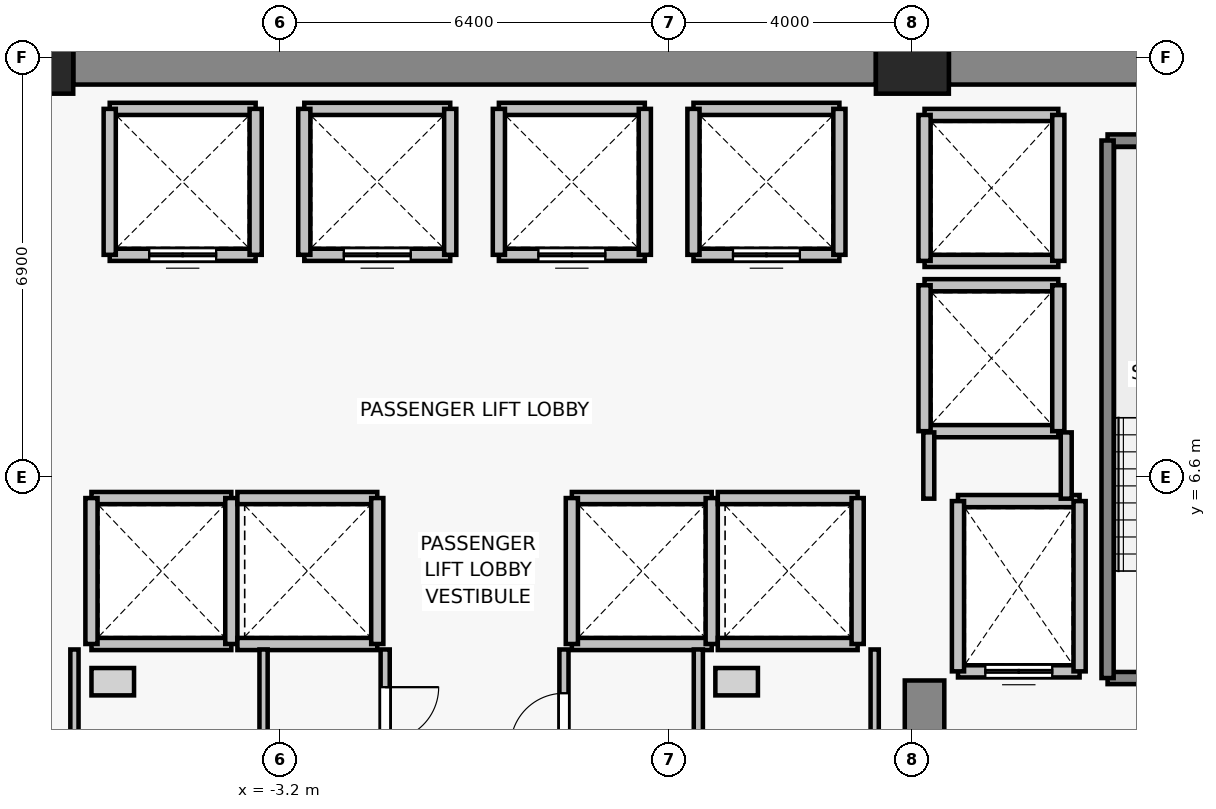
"""IFC4 building model, lengths in metres.
Left out: names, types, materials, properties, quantities, classifications, styles, units other than length and angle.
Written with IfcOpenShell. Run it as: python <this file> out.ifc"""

import sys

from ifc_helpers import new_model, si_unit, direction, frame, frame_2d, origin, origin_2d, place, context, subcontext, project, spatial, rectangle, extrude, source, transform, mapped, element, fill, save


model = new_model("IFC4")
c1 = context("Model", 3, precision=1e-05, world=origin(), true_north=direction((0.0, 1.0)))
c2 = subcontext(c1, "Body", "Model", "MODEL_VIEW")
j1 = project(units=[si_unit("LENGTHUNIT", "METRE"), si_unit("PLANEANGLEUNIT", "RADIAN")], contexts=[c1])
p1 = place(None, origin())
s1 = spatial("IfcSite", under=j1, at=p1, CompositionType="ELEMENT")
p2 = place(p1, origin())
s2 = spatial("IfcBuilding", under=s1, at=p2, CompositionType="ELEMENT")
p3 = place(p2, frame((0.0, 0.0, 50.5)))
s3 = spatial("IfcBuildingStorey", under=s2, at=p3, CompositionType="ELEMENT", Elevation=50.5)
for number, where, z_axis, x_axis in (
    (1, (-7.2, 13.5, 0.0), (0.0, 0.0, 1.0), (1.0, 0.0, 0.0)),
    (2, (7.2, 13.5, 0.0), (0.0, 0.0, 1.0), (1.0, 0.0, 0.0)),
):
    element("IfcColumn", number, at=place(p3, frame(where, z_axis=z_axis, x_axis=x_axis)), inside=s3, PredefinedType="COLUMN", context=c2, shape_type="SweptSolid", body=[
        extrude(rectangle(XDim=1.2, YDim=1.2, at=origin_2d()), origin(), (0.0, 0.0, 1.0), 3.3),
    ])
p4 = place(p3, frame((-6.6, 13.5, 0.0), z_axis=(0.0, 0.0, 1.0), x_axis=(1.0, 0.0, 0.0)))
e3 = element("IfcWall", 3, at=p4, inside=s3, PredefinedType="SHEAR", context=c2, shape_type="SweptSolid", body=[
    extrude(rectangle(XDim=13.2, YDim=0.9, at=frame_2d((6.6, 0.0))), origin(), (0.0, 0.0, 1.0), 3.075),
])
p5 = place(p3, frame((7.8, 13.5, 0.0), z_axis=(0.0, 0.0, 1.0), x_axis=(1.0, 0.0, 0.0)))
e4 = element("IfcWall", 4, at=p5, inside=s3, PredefinedType="SHEAR", context=c2, shape_type="SweptSolid", body=[
    extrude(rectangle(XDim=6.0, YDim=0.9, at=frame_2d((3.0, 0.0))), origin(), (0.0, 0.0, 1.0), 3.075),
])
p6 = place(p3, frame((7.4, -0.75, 0.0), z_axis=(0.0, 0.0, 1.0), x_axis=(0.0, 1.0, 0.0)))
e5 = element("IfcWall", 5, at=p6, inside=s3, PredefinedType="SHEAR", context=c2, shape_type="SweptSolid", body=[
    extrude(rectangle(XDim=4.0, YDim=0.65, at=frame_2d((2.0, 0.0))), origin(), (0.0, 0.0, 1.0), 3.075),
])
p7 = place(p3, frame((9.95, 3.4, 0.0), z_axis=(0.0, 0.0, 1.0), x_axis=(-1.0, 0.0, 0.0)))
e6 = element("IfcWall", 6, at=p7, inside=s3, PredefinedType="SOLIDWALL", context=c2, shape_type="SweptSolid", body=[
    extrude(rectangle(XDim=2.0, YDim=0.2, at=frame_2d((1.0, 0.0))), origin(), (0.0, 0.0, 1.0), 3.075),
])
p8 = place(p7, frame((0.45, 0.0, 0.0)))
e7 = element("IfcOpeningElement", 7, at=p8, cuts=e6, PredefinedType="OPENING", context=c2, shape_type="SweptSolid", body=[
    extrude(rectangle(XDim=1.1, YDim=2.2, at=frame_2d((0.55, 1.1))), frame((0.0, 0.11, 0.0), z_axis=(0.0, -1.0, 0.0), x_axis=(1.0, 0.0, 0.0)), (0.0, 0.0, 1.0), 0.22),
])
p9 = place(p3, frame((7.95, 6.2, 0.0), z_axis=(0.0, 0.0, 1.0), x_axis=(1.0, 0.0, 0.0)))
e8 = element("IfcWall", 8, at=p9, inside=s3, PredefinedType="SOLIDWALL", context=c2, shape_type="SweptSolid", body=[
    extrude(rectangle(XDim=2.0, YDim=0.2, at=frame_2d((1.0, 0.0))), origin(), (0.0, 0.0, 1.0), 3.075),
])
for number, where, z_axis, x_axis in (
    (9, (7.95, 3.4, 0.0), (0.0, 0.0, 1.0), (0.0, 1.0, 0.0)),
    (10, (9.95, 6.2, 0.0), (0.0, 0.0, 1.0), (0.0, -1.0, 0.0)),
):
    element("IfcWall", number, at=place(p3, frame(where, z_axis=z_axis, x_axis=x_axis)), inside=s3, PredefinedType="SOLIDWALL", context=c2, shape_type="SweptSolid", body=[
        extrude(rectangle(XDim=2.8, YDim=0.2, at=frame_2d((1.4, 0.0))), origin(), (0.0, 0.0, 1.0), 3.075),
    ])
p10 = place(p3, frame((-3.6, 10.25, 0.0), z_axis=(0.0, 0.0, 1.0), x_axis=(-1.0, 0.0, 0.0)))
e11 = element("IfcWall", 11, at=p10, inside=s3, PredefinedType="SOLIDWALL", context=c2, shape_type="SweptSolid", body=[
    extrude(rectangle(XDim=2.4, YDim=0.2, at=frame_2d((1.2, 0.0))), origin(), (0.0, 0.0, 1.0), 3.075),
])
p11 = place(p10, frame((0.65, 0.0, 0.0)))
e12 = element("IfcOpeningElement", 12, at=p11, cuts=e11, PredefinedType="OPENING", context=c2, shape_type="SweptSolid", body=[
    extrude(rectangle(XDim=1.1, YDim=2.2, at=frame_2d((0.55, 1.1))), frame((0.0, 0.11, 0.0), z_axis=(0.0, -1.0, 0.0), x_axis=(1.0, 0.0, 0.0)), (0.0, 0.0, 1.0), 0.22),
])
for number, where, z_axis, x_axis in (
    (13, (-6.0, 12.65, 0.0), (0.0, 0.0, 1.0), (1.0, 0.0, 0.0)),
    (14, (-6.0, 10.25, 0.0), (0.0, 0.0, 1.0), (0.0, 1.0, 0.0)),
    (15, (-3.6, 12.65, 0.0), (0.0, 0.0, 1.0), (0.0, -1.0, 0.0)),
):
    element("IfcWall", number, at=place(p3, frame(where, z_axis=z_axis, x_axis=x_axis)), inside=s3, PredefinedType="SOLIDWALL", context=c2, shape_type="SweptSolid", body=[
        extrude(rectangle(XDim=2.4, YDim=0.2, at=frame_2d((1.2, 0.0))), origin(), (0.0, 0.0, 1.0), 3.075),
    ])
p12 = place(p3, frame((-0.4, 10.25, 0.0), z_axis=(0.0, 0.0, 1.0), x_axis=(-1.0, 0.0, 0.0)))
e16 = element("IfcWall", 16, at=p12, inside=s3, PredefinedType="SOLIDWALL", context=c2, shape_type="SweptSolid", body=[
    extrude(rectangle(XDim=2.4, YDim=0.2, at=frame_2d((1.2, 0.0))), origin(), (0.0, 0.0, 1.0), 3.075),
])
p13 = place(p12, frame((0.65, 0.0, 0.0)))
e17 = element("IfcOpeningElement", 17, at=p13, cuts=e16, PredefinedType="OPENING", context=c2, shape_type="SweptSolid", body=[
    extrude(rectangle(XDim=1.1, YDim=2.2, at=frame_2d((0.55, 1.1))), frame((0.0, 0.11, 0.0), z_axis=(0.0, -1.0, 0.0), x_axis=(1.0, 0.0, 0.0)), (0.0, 0.0, 1.0), 0.22),
])
p14 = place(p3, frame((-2.8, 12.65, 0.0), z_axis=(0.0, 0.0, 1.0), x_axis=(1.0, 0.0, 0.0)))
e18 = element("IfcWall", 18, at=p14, inside=s3, PredefinedType="SOLIDWALL", context=c2, shape_type="SweptSolid", body=[
    extrude(rectangle(XDim=2.4, YDim=0.2, at=frame_2d((1.2, 0.0))), origin(), (0.0, 0.0, 1.0), 3.075),
])
for number, where, z_axis, x_axis in (
    (19, (-2.8, 10.25, 0.0), (0.0, 0.0, 1.0), (0.0, 1.0, 0.0)),
    (20, (-0.4, 12.65, 0.0), (0.0, 0.0, 1.0), (0.0, -1.0, 0.0)),
):
    element("IfcWall", number, at=place(p3, frame(where, z_axis=z_axis, x_axis=x_axis)), inside=s3, PredefinedType="SOLIDWALL", context=c2, shape_type="SweptSolid", body=[
        extrude(rectangle(XDim=2.4, YDim=0.2, at=frame_2d((1.2, 0.0))), origin(), (0.0, 0.0, 1.0), 3.075),
    ])
p15 = place(p3, frame((2.8, 10.25, 0.0), z_axis=(0.0, 0.0, 1.0), x_axis=(-1.0, 0.0, 0.0)))
e21 = element("IfcWall", 21, at=p15, inside=s3, PredefinedType="SOLIDWALL", context=c2, shape_type="SweptSolid", body=[
    extrude(rectangle(XDim=2.4, YDim=0.2, at=frame_2d((1.2, 0.0))), origin(), (0.0, 0.0, 1.0), 3.075),
])
p16 = place(p15, frame((0.65, 0.0, 0.0)))
e22 = element("IfcOpeningElement", 22, at=p16, cuts=e21, PredefinedType="OPENING", context=c2, shape_type="SweptSolid", body=[
    extrude(rectangle(XDim=1.1, YDim=2.2, at=frame_2d((0.55, 1.1))), frame((0.0, 0.11, 0.0), z_axis=(0.0, -1.0, 0.0), x_axis=(1.0, 0.0, 0.0)), (0.0, 0.0, 1.0), 0.22),
])
p17 = place(p3, frame((0.4, 12.65, 0.0), z_axis=(0.0, 0.0, 1.0), x_axis=(1.0, 0.0, 0.0)))
e23 = element("IfcWall", 23, at=p17, inside=s3, PredefinedType="SOLIDWALL", context=c2, shape_type="SweptSolid", body=[
    extrude(rectangle(XDim=2.4, YDim=0.2, at=frame_2d((1.2, 0.0))), origin(), (0.0, 0.0, 1.0), 3.075),
])
for number, where, z_axis, x_axis in (
    (24, (0.4, 10.25, 0.0), (0.0, 0.0, 1.0), (0.0, 1.0, 0.0)),
    (25, (2.8, 12.65, 0.0), (0.0, 0.0, 1.0), (0.0, -1.0, 0.0)),
):
    element("IfcWall", number, at=place(p3, frame(where, z_axis=z_axis, x_axis=x_axis)), inside=s3, PredefinedType="SOLIDWALL", context=c2, shape_type="SweptSolid", body=[
        extrude(rectangle(XDim=2.4, YDim=0.2, at=frame_2d((1.2, 0.0))), origin(), (0.0, 0.0, 1.0), 3.075),
    ])
p18 = place(p3, frame((6.0, 10.25, 0.0), z_axis=(0.0, 0.0, 1.0), x_axis=(-1.0, 0.0, 0.0)))
e26 = element("IfcWall", 26, at=p18, inside=s3, PredefinedType="SOLIDWALL", context=c2, shape_type="SweptSolid", body=[
    extrude(rectangle(XDim=2.4, YDim=0.2, at=frame_2d((1.2, 0.0))), origin(), (0.0, 0.0, 1.0), 3.075),
])
p19 = place(p18, frame((0.65, 0.0, 0.0)))
e27 = element("IfcOpeningElement", 27, at=p19, cuts=e26, PredefinedType="OPENING", context=c2, shape_type="SweptSolid", body=[
    extrude(rectangle(XDim=1.1, YDim=2.2, at=frame_2d((0.55, 1.1))), frame((0.0, 0.11, 0.0), z_axis=(0.0, -1.0, 0.0), x_axis=(1.0, 0.0, 0.0)), (0.0, 0.0, 1.0), 0.22),
])
for number, where, z_axis, x_axis in (
    (28, (3.6, 12.65, 0.0), (0.0, 0.0, 1.0), (1.0, 0.0, 0.0)),
    (29, (3.6, 10.25, 0.0), (0.0, 0.0, 1.0), (0.0, 1.0, 0.0)),
    (30, (6.0, 12.65, 0.0), (0.0, 0.0, 1.0), (0.0, -1.0, 0.0)),
):
    element("IfcWall", number, at=place(p3, frame(where, z_axis=z_axis, x_axis=x_axis)), inside=s3, PredefinedType="SOLIDWALL", context=c2, shape_type="SweptSolid", body=[
        extrude(rectangle(XDim=2.4, YDim=0.2, at=frame_2d((1.2, 0.0))), origin(), (0.0, 0.0, 1.0), 3.075),
    ])
for number, where, z_axis, x_axis in (
    (31, (-4.0, 3.85, 0.0), (0.0, 0.0, 1.0), (-1.0, 0.0, 0.0)),
    (32, (-6.3, 6.25, 0.0), (0.0, 0.0, 1.0), (1.0, 0.0, 0.0)),
):
    element("IfcWall", number, at=place(p3, frame(where, z_axis=z_axis, x_axis=x_axis)), inside=s3, PredefinedType="SOLIDWALL", context=c2, shape_type="SweptSolid", body=[
        extrude(rectangle(XDim=2.3, YDim=0.2, at=frame_2d((1.15, 0.0))), origin(), (0.0, 0.0, 1.0), 3.075),
    ])
for number, where, z_axis, x_axis in (
    (33, (-6.3, 3.85, 0.0), (0.0, 0.0, 1.0), (0.0, 1.0, 0.0)),
    (34, (-4.0, 6.25, 0.0), (0.0, 0.0, 1.0), (0.0, -1.0, 0.0)),
):
    element("IfcWall", number, at=place(p3, frame(where, z_axis=z_axis, x_axis=x_axis)), inside=s3, PredefinedType="SOLIDWALL", context=c2, shape_type="SweptSolid", body=[
        extrude(rectangle(XDim=2.4, YDim=0.2, at=frame_2d((1.2, 0.0))), origin(), (0.0, 0.0, 1.0), 3.075),
    ])
for number, where, z_axis, x_axis in (
    (35, (-1.6, 3.85, 0.0), (0.0, 0.0, 1.0), (-1.0, 0.0, 0.0)),
    (36, (-3.9, 6.25, 0.0), (0.0, 0.0, 1.0), (1.0, 0.0, 0.0)),
):
    element("IfcWall", number, at=place(p3, frame(where, z_axis=z_axis, x_axis=x_axis)), inside=s3, PredefinedType="SOLIDWALL", context=c2, shape_type="SweptSolid", body=[
        extrude(rectangle(XDim=2.3, YDim=0.2, at=frame_2d((1.15, 0.0))), origin(), (0.0, 0.0, 1.0), 3.075),
    ])
p20 = place(p3, frame((-1.6, 6.25, 0.0), z_axis=(0.0, 0.0, 1.0), x_axis=(0.0, -1.0, 0.0)))
e37 = element("IfcWall", 37, at=p20, inside=s3, PredefinedType="SOLIDWALL", context=c2, shape_type="SweptSolid", body=[
    extrude(rectangle(XDim=2.4, YDim=0.2, at=frame_2d((1.2, 0.0))), origin(), (0.0, 0.0, 1.0), 3.075),
])
for number, where, z_axis, x_axis in (
    (38, (3.9, 3.85, 0.0), (0.0, 0.0, 1.0), (-1.0, 0.0, 0.0)),
    (39, (1.6, 6.25, 0.0), (0.0, 0.0, 1.0), (1.0, 0.0, 0.0)),
):
    element("IfcWall", number, at=place(p3, frame(where, z_axis=z_axis, x_axis=x_axis)), inside=s3, PredefinedType="SOLIDWALL", context=c2, shape_type="SweptSolid", body=[
        extrude(rectangle(XDim=2.3, YDim=0.2, at=frame_2d((1.15, 0.0))), origin(), (0.0, 0.0, 1.0), 3.075),
    ])
for number, where, z_axis, x_axis in (
    (40, (1.6, 3.85, 0.0), (0.0, 0.0, 1.0), (0.0, 1.0, 0.0)),
    (41, (3.9, 6.25, 0.0), (0.0, 0.0, 1.0), (0.0, -1.0, 0.0)),
):
    element("IfcWall", number, at=place(p3, frame(where, z_axis=z_axis, x_axis=x_axis)), inside=s3, PredefinedType="SOLIDWALL", context=c2, shape_type="SweptSolid", body=[
        extrude(rectangle(XDim=2.4, YDim=0.2, at=frame_2d((1.2, 0.0))), origin(), (0.0, 0.0, 1.0), 3.075),
    ])
for number, where, z_axis, x_axis in (
    (42, (6.3, 3.85, 0.0), (0.0, 0.0, 1.0), (-1.0, 0.0, 0.0)),
    (43, (4.0, 6.25, 0.0), (0.0, 0.0, 1.0), (1.0, 0.0, 0.0)),
):
    element("IfcWall", number, at=place(p3, frame(where, z_axis=z_axis, x_axis=x_axis)), inside=s3, PredefinedType="SOLIDWALL", context=c2, shape_type="SweptSolid", body=[
        extrude(rectangle(XDim=2.3, YDim=0.2, at=frame_2d((1.15, 0.0))), origin(), (0.0, 0.0, 1.0), 3.075),
    ])
p21 = place(p3, frame((6.3, 6.25, 0.0), z_axis=(0.0, 0.0, 1.0), x_axis=(0.0, -1.0, 0.0)))
e44 = element("IfcWall", 44, at=p21, inside=s3, PredefinedType="SOLIDWALL", context=c2, shape_type="SweptSolid", body=[
    extrude(rectangle(XDim=2.4, YDim=0.2, at=frame_2d((1.2, 0.0))), origin(), (0.0, 0.0, 1.0), 3.075),
])
for number, where, z_axis, x_axis in (
    (45, (9.6, 7.35, 0.0), (0.0, 0.0, 1.0), (-1.0, 0.0, 0.0)),
    (46, (7.4, 9.75, 0.0), (0.0, 0.0, 1.0), (1.0, 0.0, 0.0)),
):
    element("IfcWall", number, at=place(p3, frame(where, z_axis=z_axis, x_axis=x_axis)), inside=s3, PredefinedType="SOLIDWALL", context=c2, shape_type="SweptSolid", body=[
        extrude(rectangle(XDim=2.2, YDim=0.2, at=frame_2d((1.1, 0.0))), origin(), (0.0, 0.0, 1.0), 2.465),
    ])
p22 = place(p3, frame((7.4, 7.35, 0.0), z_axis=(0.0, 0.0, 1.0), x_axis=(0.0, 1.0, 0.0)))
e47 = element("IfcWall", 47, at=p22, inside=s3, PredefinedType="SOLIDWALL", context=c2, shape_type="SweptSolid", body=[
    extrude(rectangle(XDim=2.4, YDim=0.2, at=frame_2d((1.2, 0.0))), origin(), (0.0, 0.0, 1.0), 2.465),
])
p23 = place(p3, frame((9.6, 9.75, 0.0), z_axis=(0.0, 0.0, 1.0), x_axis=(0.0, -1.0, 0.0)))
e48 = element("IfcWall", 48, at=p23, inside=s3, PredefinedType="SOLIDWALL", context=c2, shape_type="SweptSolid", body=[
    extrude(rectangle(XDim=2.4, YDim=0.2, at=frame_2d((1.2, 0.0))), origin(), (0.0, 0.0, 1.0), 3.075),
])
for number, where, z_axis, x_axis in (
    (49, (9.6, 10.15, 0.0), (0.0, 0.0, 1.0), (-1.0, 0.0, 0.0)),
    (50, (7.4, 12.55, 0.0), (0.0, 0.0, 1.0), (1.0, 0.0, 0.0)),
):
    element("IfcWall", number, at=place(p3, frame(where, z_axis=z_axis, x_axis=x_axis)), inside=s3, PredefinedType="SOLIDWALL", context=c2, shape_type="SweptSolid", body=[
        extrude(rectangle(XDim=2.2, YDim=0.2, at=frame_2d((1.1, 0.0))), origin(), (0.0, 0.0, 1.0), 2.465),
    ])
p24 = place(p3, frame((7.4, 10.15, 0.0), z_axis=(0.0, 0.0, 1.0), x_axis=(0.0, 1.0, 0.0)))
e51 = element("IfcWall", 51, at=p24, inside=s3, PredefinedType="SOLIDWALL", context=c2, shape_type="SweptSolid", body=[
    extrude(rectangle(XDim=2.4, YDim=0.2, at=frame_2d((1.2, 0.0))), origin(), (0.0, 0.0, 1.0), 2.465),
])
p25 = place(p3, frame((9.6, 12.55, 0.0), z_axis=(0.0, 0.0, 1.0), x_axis=(0.0, -1.0, 0.0)))
e52 = element("IfcWall", 52, at=p25, inside=s3, PredefinedType="SOLIDWALL", context=c2, shape_type="SweptSolid", body=[
    extrude(rectangle(XDim=2.4, YDim=0.2, at=frame_2d((1.2, 0.0))), origin(), (0.0, 0.0, 1.0), 3.075),
])
p26 = place(p3, frame((13.93, 3.29, 0.0), z_axis=(0.0, 0.0, 1.0), x_axis=(-1.0, 0.0, 0.0)))
e53 = element("IfcWall", 53, at=p26, inside=s3, PredefinedType="SOLIDWALL", context=c2, shape_type="SweptSolid", body=[
    extrude(rectangle(XDim=3.52, YDim=0.2, at=frame_2d((1.76, 0.0))), origin(), (0.0, 0.0, 1.0), 3.075),
])
p27 = place(p26, frame((1.205, 0.0, 0.0)))
e54 = element("IfcOpeningElement", 54, at=p27, cuts=e53, PredefinedType="OPENING", context=c2, shape_type="SweptSolid", body=[
    extrude(rectangle(XDim=1.15, YDim=2.15, at=frame_2d((0.575, 1.075))), frame((0.0, 0.11, 0.0), z_axis=(0.0, -1.0, 0.0), x_axis=(1.0, 0.0, 0.0)), (0.0, 0.0, 1.0), 0.22),
])
p28 = place(p3, frame((10.41, 12.13, 0.0), z_axis=(0.0, 0.0, 1.0), x_axis=(1.0, 0.0, 0.0)))
e55 = element("IfcWall", 55, at=p28, inside=s3, PredefinedType="SOLIDWALL", context=c2, shape_type="SweptSolid", body=[
    extrude(rectangle(XDim=3.52, YDim=0.2, at=frame_2d((1.76, 0.0))), origin(), (0.0, 0.0, 1.0), 3.075),
])
p29 = place(p3, frame((10.41, 3.29, 0.0), z_axis=(0.0, 0.0, 1.0), x_axis=(0.0, 1.0, 0.0)))
e56 = element("IfcWall", 56, at=p29, inside=s3, PredefinedType="SOLIDWALL", context=c2, shape_type="SweptSolid", body=[
    extrude(rectangle(XDim=8.84, YDim=0.2, at=frame_2d((4.42, 0.0))), origin(), (0.0, 0.0, 1.0), 3.075),
])
p30 = place(p3, frame((7.47, 6.24, 0.0), z_axis=(0.0, 0.0, 1.0), x_axis=(0.0, 1.0, 0.0)))
e57 = element("IfcWall", 57, at=p30, inside=s3, PredefinedType="PARTITIONING", context=c2, shape_type="SweptSolid", body=[
    extrude(rectangle(XDim=1.09, YDim=0.18, at=frame_2d((0.545, 0.0))), origin(), (0.0, 0.0, 1.0), 2.465),
])
p31 = place(p3, frame((9.73, 7.33, 0.0), z_axis=(0.0, 0.0, 1.0), x_axis=(0.0, -1.0, 0.0)))
e58 = element("IfcWall", 58, at=p31, inside=s3, PredefinedType="PARTITIONING", context=c2, shape_type="SweptSolid", body=[
    extrude(rectangle(XDim=1.09, YDim=0.18, at=frame_2d((0.545, 0.0))), origin(), (0.0, 0.0, 1.0), 3.075),
])
for number, where, z_axis, x_axis in (
    (59, (-6.58, -0.73, 0.0), (0.0, 0.0, 1.0), (0.0, 1.0, 0.0)),
    (60, (-3.47, 3.76, 0.0), (0.0, 0.0, 1.0), (0.0, -1.0, 0.0)),
):
    element("IfcWall", number, at=place(p3, frame(where, z_axis=z_axis, x_axis=x_axis)), inside=s3, PredefinedType="PARTITIONING", context=c2, shape_type="SweptSolid", body=[
        extrude(rectangle(XDim=4.49, YDim=0.135, at=frame_2d((2.245, 0.0))), origin(), (0.0, 0.0, 1.0), 3.075),
    ])
p32 = place(p3, frame((-1.47, 3.76, 0.0), z_axis=(0.0, 0.0, 1.0), x_axis=(0.0, -1.0, 0.0)))
e61 = element("IfcWall", 61, at=p32, inside=s3, PredefinedType="PARTITIONING", context=c2, shape_type="SweptSolid", body=[
    extrude(rectangle(XDim=2.13, YDim=0.15, at=frame_2d((1.065, 0.0))), origin(), (0.0, 0.0, 1.0), 3.075),
])
p33 = place(p32, frame((0.62, 0.0, 0.0)))
e62 = element("IfcOpeningElement", 62, at=p33, cuts=e61, PredefinedType="OPENING", context=c2, shape_type="SweptSolid", body=[
    extrude(rectangle(XDim=0.88, YDim=2.1, at=frame_2d((0.44, 1.05))), frame((0.0, 0.085, 0.0), z_axis=(0.0, -1.0, 0.0), x_axis=(1.0, 0.0, 0.0)), (0.0, 0.0, 1.0), 0.17),
])
p34 = place(p3, frame((1.47, 1.43, 0.0), z_axis=(0.0, 0.0, 1.0), x_axis=(0.0, 1.0, 0.0)))
e63 = element("IfcWall", 63, at=p34, inside=s3, PredefinedType="PARTITIONING", context=c2, shape_type="SweptSolid", body=[
    extrude(rectangle(XDim=2.33, YDim=0.15, at=frame_2d((1.165, 0.0))), origin(), (0.0, 0.0, 1.0), 3.075),
])
p35 = place(p34, frame((0.73, 0.0, 0.0)))
e64 = element("IfcOpeningElement", 64, at=p35, cuts=e63, PredefinedType="OPENING", context=c2, shape_type="SweptSolid", body=[
    extrude(rectangle(XDim=0.88, YDim=2.15, at=frame_2d((0.44, 1.075))), frame((0.0, 0.085, 0.0), z_axis=(0.0, -1.0, 0.0), x_axis=(1.0, 0.0, 0.0)), (0.0, 0.0, 1.0), 0.17),
])
p36 = place(p3, frame((3.68, 3.76, 0.0), z_axis=(0.0, 0.0, 1.0), x_axis=(0.0, -1.0, 0.0)))
e65 = element("IfcWall", 65, at=p36, inside=s3, PredefinedType="PARTITIONING", context=c2, shape_type="SweptSolid", body=[
    extrude(rectangle(XDim=2.33, YDim=0.15, at=frame_2d((1.165, 0.0))), origin(), (0.0, 0.0, 1.0), 3.075),
])
p37 = place(p3, frame((6.58, 3.76, 0.0), z_axis=(0.0, 0.0, 1.0), x_axis=(0.0, -1.0, 0.0)))
e66 = element("IfcWall", 66, at=p37, inside=s3, PredefinedType="PARTITIONING", context=c2, shape_type="SweptSolid", body=[
    extrude(rectangle(XDim=4.49, YDim=0.135, at=frame_2d((2.245, 0.0))), origin(), (0.0, 0.0, 1.0), 3.075),
])
m1 = source(origin(), c2, "Body", "SweptSolid", [
    extrude(rectangle(XDim=1.1, YDim=2.2, at=frame_2d((0.55, 1.1))), frame((0.0, 0.025, 0.0), z_axis=(0.0, -1.0, 0.0), x_axis=(1.0, 0.0, 0.0)), (0.0, 0.0, 1.0), 0.05),
])
p38 = place(p8, origin())
e67 = element("IfcDoor", 67, at=p38, inside=s3, OperationType="DOUBLE_DOOR_SLIDING", PredefinedType="DOOR", context=c2, shape_type="MappedRepresentation", body=[
    mapped(m1, transform((0.0, 0.0, 0.0), x_axis=(1.0, 0.0, 0.0), y_axis=(0.0, 1.0, 0.0), z_axis=(0.0, 0.0, 1.0), scale=1.0)),
])
fill(e7, e67)
p39 = place(p11, origin())
e68 = element("IfcDoor", 68, at=p39, inside=s3, OperationType="DOUBLE_DOOR_SLIDING", PredefinedType="DOOR", context=c2, shape_type="MappedRepresentation", body=[
    mapped(m1, transform((0.0, 0.0, 0.0), x_axis=(1.0, 0.0, 0.0), y_axis=(0.0, 1.0, 0.0), z_axis=(0.0, 0.0, 1.0), scale=1.0)),
])
fill(e12, e68)
p40 = place(p13, origin())
e69 = element("IfcDoor", 69, at=p40, inside=s3, OperationType="DOUBLE_DOOR_SLIDING", PredefinedType="DOOR", context=c2, shape_type="MappedRepresentation", body=[
    mapped(m1, transform((0.0, 0.0, 0.0), x_axis=(1.0, 0.0, 0.0), y_axis=(0.0, 1.0, 0.0), z_axis=(0.0, 0.0, 1.0), scale=1.0)),
])
fill(e17, e69)
p41 = place(p16, origin())
e70 = element("IfcDoor", 70, at=p41, inside=s3, OperationType="DOUBLE_DOOR_SLIDING", PredefinedType="DOOR", context=c2, shape_type="MappedRepresentation", body=[
    mapped(m1, transform((0.0, 0.0, 0.0), x_axis=(1.0, 0.0, 0.0), y_axis=(0.0, 1.0, 0.0), z_axis=(0.0, 0.0, 1.0), scale=1.0)),
])
fill(e22, e70)
p42 = place(p19, origin())
e71 = element("IfcDoor", 71, at=p42, inside=s3, OperationType="DOUBLE_DOOR_SLIDING", PredefinedType="DOOR", context=c2, shape_type="MappedRepresentation", body=[
    mapped(m1, transform((0.0, 0.0, 0.0), x_axis=(1.0, 0.0, 0.0), y_axis=(0.0, 1.0, 0.0), z_axis=(0.0, 0.0, 1.0), scale=1.0)),
])
fill(e27, e71)
m2 = source(origin(), c2, "Body", "SweptSolid", [
    extrude(rectangle(XDim=0.88, YDim=2.1, at=frame_2d((0.44, 1.05))), frame((0.0, 0.025, 0.0), z_axis=(0.0, -1.0, 0.0), x_axis=(1.0, 0.0, 0.0)), (0.0, 0.0, 1.0), 0.05),
])
p43 = place(p33, origin())
e72 = element("IfcDoor", 72, at=p43, inside=s3, OperationType="SINGLE_SWING_LEFT", PredefinedType="DOOR", context=c2, shape_type="MappedRepresentation", body=[
    mapped(m2, transform((0.0, 0.0, 0.0), x_axis=(1.0, 0.0, 0.0), y_axis=(0.0, 1.0, 0.0), z_axis=(0.0, 0.0, 1.0), scale=1.0)),
])
fill(e62, e72)
m3 = source(origin(), c2, "Body", "SweptSolid", [
    extrude(rectangle(XDim=0.88, YDim=2.15, at=frame_2d((0.44, 1.075))), frame((0.0, 0.025, 0.0), z_axis=(0.0, -1.0, 0.0), x_axis=(1.0, 0.0, 0.0)), (0.0, 0.0, 1.0), 0.05),
])
p44 = place(p35, origin())
e73 = element("IfcDoor", 73, at=p44, inside=s3, OperationType="SINGLE_SWING_LEFT", PredefinedType="DOOR", context=c2, shape_type="MappedRepresentation", body=[
    mapped(m3, transform((0.0, 0.0, 0.0), x_axis=(1.0, 0.0, 0.0), y_axis=(0.0, 1.0, 0.0), z_axis=(0.0, 0.0, 1.0), scale=1.0)),
])
fill(e64, e73)
save(model, sys.argv[1])
